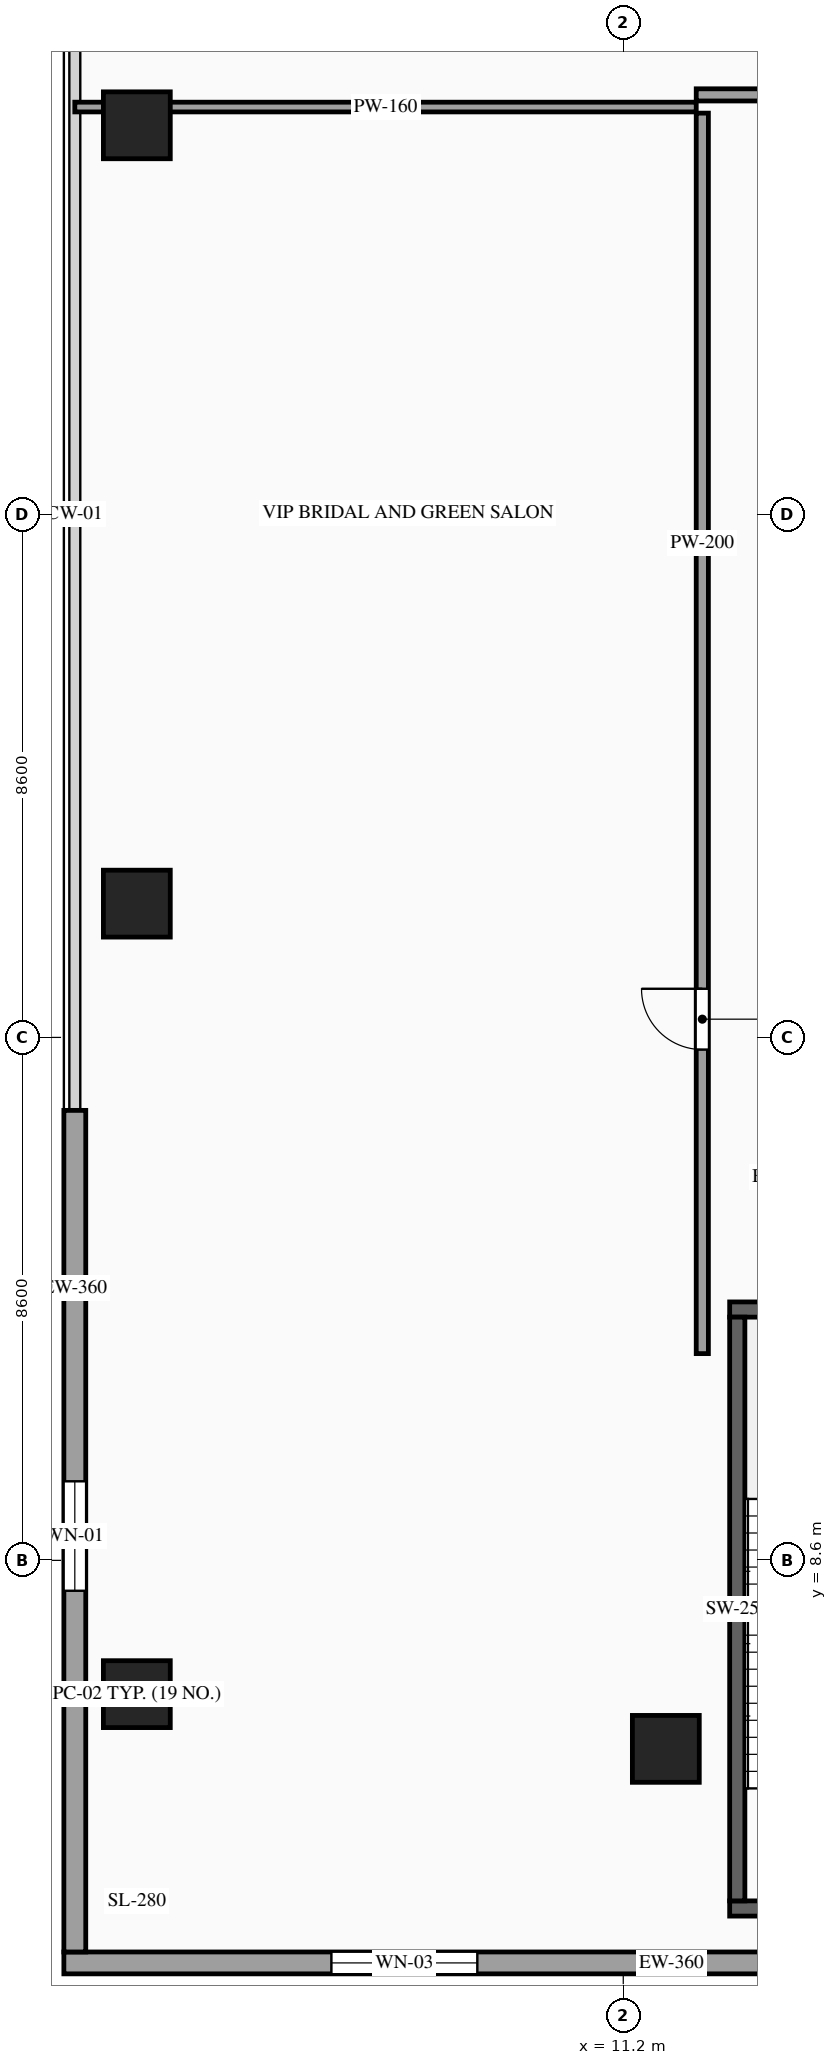
"""IFC4 building model, lengths in metres.
Left out: names, types, materials, properties, quantities, classifications, styles, units other than length and angle.
Written with IfcOpenShell. Run it as: python <this file> out.ifc"""

import sys

from ifc_helpers import new_model, si_unit, direction, frame, frame_2d, origin, origin_2d, place, context, subcontext, project, spatial, rectangle, extrude, source, transform, mapped, element, fill, save


model = new_model("IFC4")
c1 = context("Model", 3, precision=1e-05, world=origin(), true_north=direction((0.0, 1.0)))
c2 = subcontext(c1, "Body", "Model", "MODEL_VIEW")
j1 = project(units=[si_unit("LENGTHUNIT", "METRE"), si_unit("PLANEANGLEUNIT", "RADIAN")], contexts=[c1])
p1 = place(None, origin())
s1 = spatial("IfcSite", under=j1, at=p1, CompositionType="ELEMENT")
p2 = place(p1, origin())
s2 = spatial("IfcBuilding", under=s1, at=p2, CompositionType="ELEMENT")
p3 = place(p2, frame((0.0, 0.0, 19.8)))
s3 = spatial("IfcBuildingStorey", under=s2, at=p3, CompositionType="ELEMENT", Elevation=19.8)
m1 = source(origin(), c2, "Body", "SweptSolid", [
    extrude(rectangle(XDim=1.1, YDim=1.1, at=origin_2d()), origin(), (0.0, 0.0, 1.0), 6.0),
])
for number, where, z_axis, x_axis in (
    (1, (3.2, 6.4, 0.0), (0.0, 0.0, 1.0), (1.0, 0.0, 0.0)),
    (2, (3.2, 19.4, 0.0), (0.0, 0.0, 1.0), (1.0, 0.0, 0.0)),
    (3, (3.2, 32.2, 0.0), (0.0, 0.0, 1.0), (1.0, 0.0, 0.0)),
    (4, (11.9, 5.5, 0.0), (0.0, 0.0, 1.0), (1.0, 0.0, 0.0)),
):
    element("IfcColumn", number, at=place(p3, frame(where, z_axis=z_axis, x_axis=x_axis)), inside=s3, PredefinedType="COLUMN", context=c2, shape_type="MappedRepresentation", body=[
        mapped(m1, transform((0.0, 0.0, 0.0), scale=1.0)),
    ])
p4 = place(p3, frame((2.0, 1.98, 0.0), z_axis=(0.0, 0.0, 1.0), x_axis=(1.0, 0.0, 0.0)))
e5 = element("IfcWall", 5, at=p4, inside=s3, PredefinedType="SOLIDWALL", context=c2, shape_type="SweptSolid", body=[
    extrude(rectangle(XDim=12.93, YDim=0.36, at=frame_2d((6.465, 0.0))), origin(), (0.0, 0.0, 1.0), 5.68),
])
p5 = place(p4, frame((4.4, 0.0, 0.85)))
e6 = element("IfcOpeningElement", 6, at=p5, cuts=e5, PredefinedType="OPENING", context=c2, shape_type="SweptSolid", body=[
    extrude(rectangle(XDim=2.4, YDim=2.4, at=frame_2d((1.2, 1.2))), frame((0.0, 0.195, 0.0), z_axis=(0.0, -1.0, 0.0), x_axis=(1.0, 0.0, 0.0)), (0.0, 0.0, 1.0), 0.39),
])
p6 = place(p3, frame((2.18, 2.16, 0.0), z_axis=(0.0, 0.0, 1.0), x_axis=(0.0, 1.0, 0.0)))
e7 = element("IfcWall", 7, at=p6, inside=s3, PredefinedType="SOLIDWALL", context=c2, shape_type="SweptSolid", body=[
    extrude(rectangle(XDim=13.84, YDim=0.36, at=frame_2d((6.92, 0.0))), origin(), (0.0, 0.0, 1.0), 5.68),
])
p7 = place(p6, frame((5.94, 0.0, 0.9)))
e8 = element("IfcOpeningElement", 8, at=p7, cuts=e7, PredefinedType="OPENING", context=c2, shape_type="SweptSolid", body=[
    extrude(rectangle(XDim=1.8, YDim=2.2, at=frame_2d((0.9, 1.1))), frame((0.0, 0.195, 0.0), z_axis=(0.0, -1.0, 0.0), x_axis=(1.0, 0.0, 0.0)), (0.0, 0.0, 1.0), 0.39),
])
m2 = source(origin(), c2, "Body", "SweptSolid", [
    extrude(rectangle(XDim=4.3, YDim=0.25, at=frame_2d((2.15, 0.0))), origin(), (0.0, 0.0, 1.0), 5.68),
])
for number, where, z_axis, x_axis in (
    (9, (12.95, 2.875, 0.0), (0.0, 0.0, 1.0), (1.0, 0.0, 0.0)),
    (10, (12.95, 12.725, 0.0), (0.0, 0.0, 1.0), (1.0, 0.0, 0.0)),
):
    element("IfcWall", number, at=place(p3, frame(where, z_axis=z_axis, x_axis=x_axis)), inside=s3, PredefinedType="SOLIDWALL", context=c2, shape_type="MappedRepresentation", body=[
        mapped(m2, transform((0.0, 0.0, 0.0), scale=1.0)),
    ])
m3 = source(origin(), c2, "Body", "SweptSolid", [
    extrude(rectangle(XDim=9.6, YDim=0.25, at=frame_2d((4.8, 0.0))), origin(), (0.0, 0.0, 1.0), 5.68),
])
p8 = place(p3, frame((13.075, 3.0, 0.0), z_axis=(0.0, 0.0, 1.0), x_axis=(0.0, 1.0, 0.0)))
e11 = element("IfcWall", 11, at=p8, inside=s3, PredefinedType="SOLIDWALL", context=c2, shape_type="MappedRepresentation", body=[
    mapped(m3, transform((0.0, 0.0, 0.0), scale=1.0)),
])
m4 = source(origin(), c2, "Body", "SweptSolid", [
    extrude(rectangle(XDim=10.7, YDim=0.2, at=frame_2d((5.35, 0.0))), origin(), (0.0, 0.0, 1.0), 5.68),
])
p9 = place(p3, frame((12.4, 32.7, 0.0), z_axis=(0.0, 0.0, 1.0), x_axis=(1.0, 0.0, 0.0)))
e12 = element("IfcWall", 12, at=p9, inside=s3, PredefinedType="PARTITIONING", context=c2, shape_type="MappedRepresentation", body=[
    mapped(m4, transform((0.0, 0.0, 0.0), scale=1.0)),
])
p10 = place(p3, frame((12.5, 12.0, 0.0), z_axis=(0.0, 0.0, 1.0), x_axis=(0.0, 1.0, 0.0)))
e13 = element("IfcWall", 13, at=p10, inside=s3, PredefinedType="PARTITIONING", context=c2, shape_type="SweptSolid", body=[
    extrude(rectangle(XDim=20.4, YDim=0.2, at=frame_2d((10.2, 0.0))), origin(), (0.0, 0.0, 1.0), 5.68),
])
p11 = place(p10, frame((5.0, 0.0, 0.0)))
e14 = element("IfcOpeningElement", 14, at=p11, cuts=e13, PredefinedType="OPENING", context=c2, shape_type="SweptSolid", body=[
    extrude(rectangle(XDim=1.0, YDim=2.2, at=frame_2d((0.5, 1.1))), frame((0.0, 0.115, 0.0), z_axis=(0.0, -1.0, 0.0), x_axis=(1.0, 0.0, 0.0)), (0.0, 0.0, 1.0), 0.23),
])
m5 = source(origin(), c2, "Body", "SweptSolid", [
    extrude(rectangle(XDim=10.22, YDim=0.16, at=frame_2d((5.11, 0.0))), origin(), (0.0, 0.0, 1.0), 5.68),
])
p12 = place(p3, frame((2.18, 32.5, 0.0), z_axis=(0.0, 0.0, 1.0), x_axis=(1.0, 0.0, 0.0)))
e15 = element("IfcWall", 15, at=p12, inside=s3, PredefinedType="PARTITIONING", context=c2, shape_type="MappedRepresentation", body=[
    mapped(m5, transform((0.0, 0.0, 0.0), scale=1.0)),
])
m6 = source(origin(), c2, "Body", "SweptSolid", [
    extrude(rectangle(XDim=2.4, YDim=2.4, at=frame_2d((1.2, 1.2))), frame((0.0, 0.03, 0.0), z_axis=(0.0, -1.0, 0.0), x_axis=(1.0, 0.0, 0.0)), (0.0, 0.0, 1.0), 0.06),
])
p13 = place(p5, origin())
e16 = element("IfcWindow", 16, at=p13, inside=s3, PartitioningType="SINGLE_PANEL", PredefinedType="WINDOW", context=c2, shape_type="MappedRepresentation", body=[
    mapped(m6, transform((0.0, 0.0, 0.0), scale=1.0)),
])
fill(e6, e16)
m7 = source(origin(), c2, "Body", "SweptSolid", [
    extrude(rectangle(XDim=1.8, YDim=2.2, at=frame_2d((0.9, 1.1))), frame((0.0, 0.03, 0.0), z_axis=(0.0, -1.0, 0.0), x_axis=(1.0, 0.0, 0.0)), (0.0, 0.0, 1.0), 0.06),
])
p14 = place(p7, origin())
e17 = element("IfcWindow", 17, at=p14, inside=s3, PartitioningType="SINGLE_PANEL", PredefinedType="WINDOW", context=c2, shape_type="MappedRepresentation", body=[
    mapped(m7, transform((0.0, 0.0, 0.0), scale=1.0)),
])
fill(e8, e17)
m8 = source(origin(), c2, "Body", "SweptSolid", [
    extrude(rectangle(XDim=1.0, YDim=2.2, at=frame_2d((0.5, 1.1))), frame((0.0, 0.025, 0.0), z_axis=(0.0, -1.0, 0.0), x_axis=(1.0, 0.0, 0.0)), (0.0, 0.0, 1.0), 0.05),
])
p15 = place(p11, origin())
e18 = element("IfcDoor", 18, at=p15, inside=s3, OperationType="SINGLE_SWING_RIGHT", PredefinedType="DOOR", context=c2, shape_type="MappedRepresentation", body=[
    mapped(m8, transform((0.0, 0.0, 0.0), scale=1.0)),
])
fill(e14, e18)
save(model, sys.argv[1])
